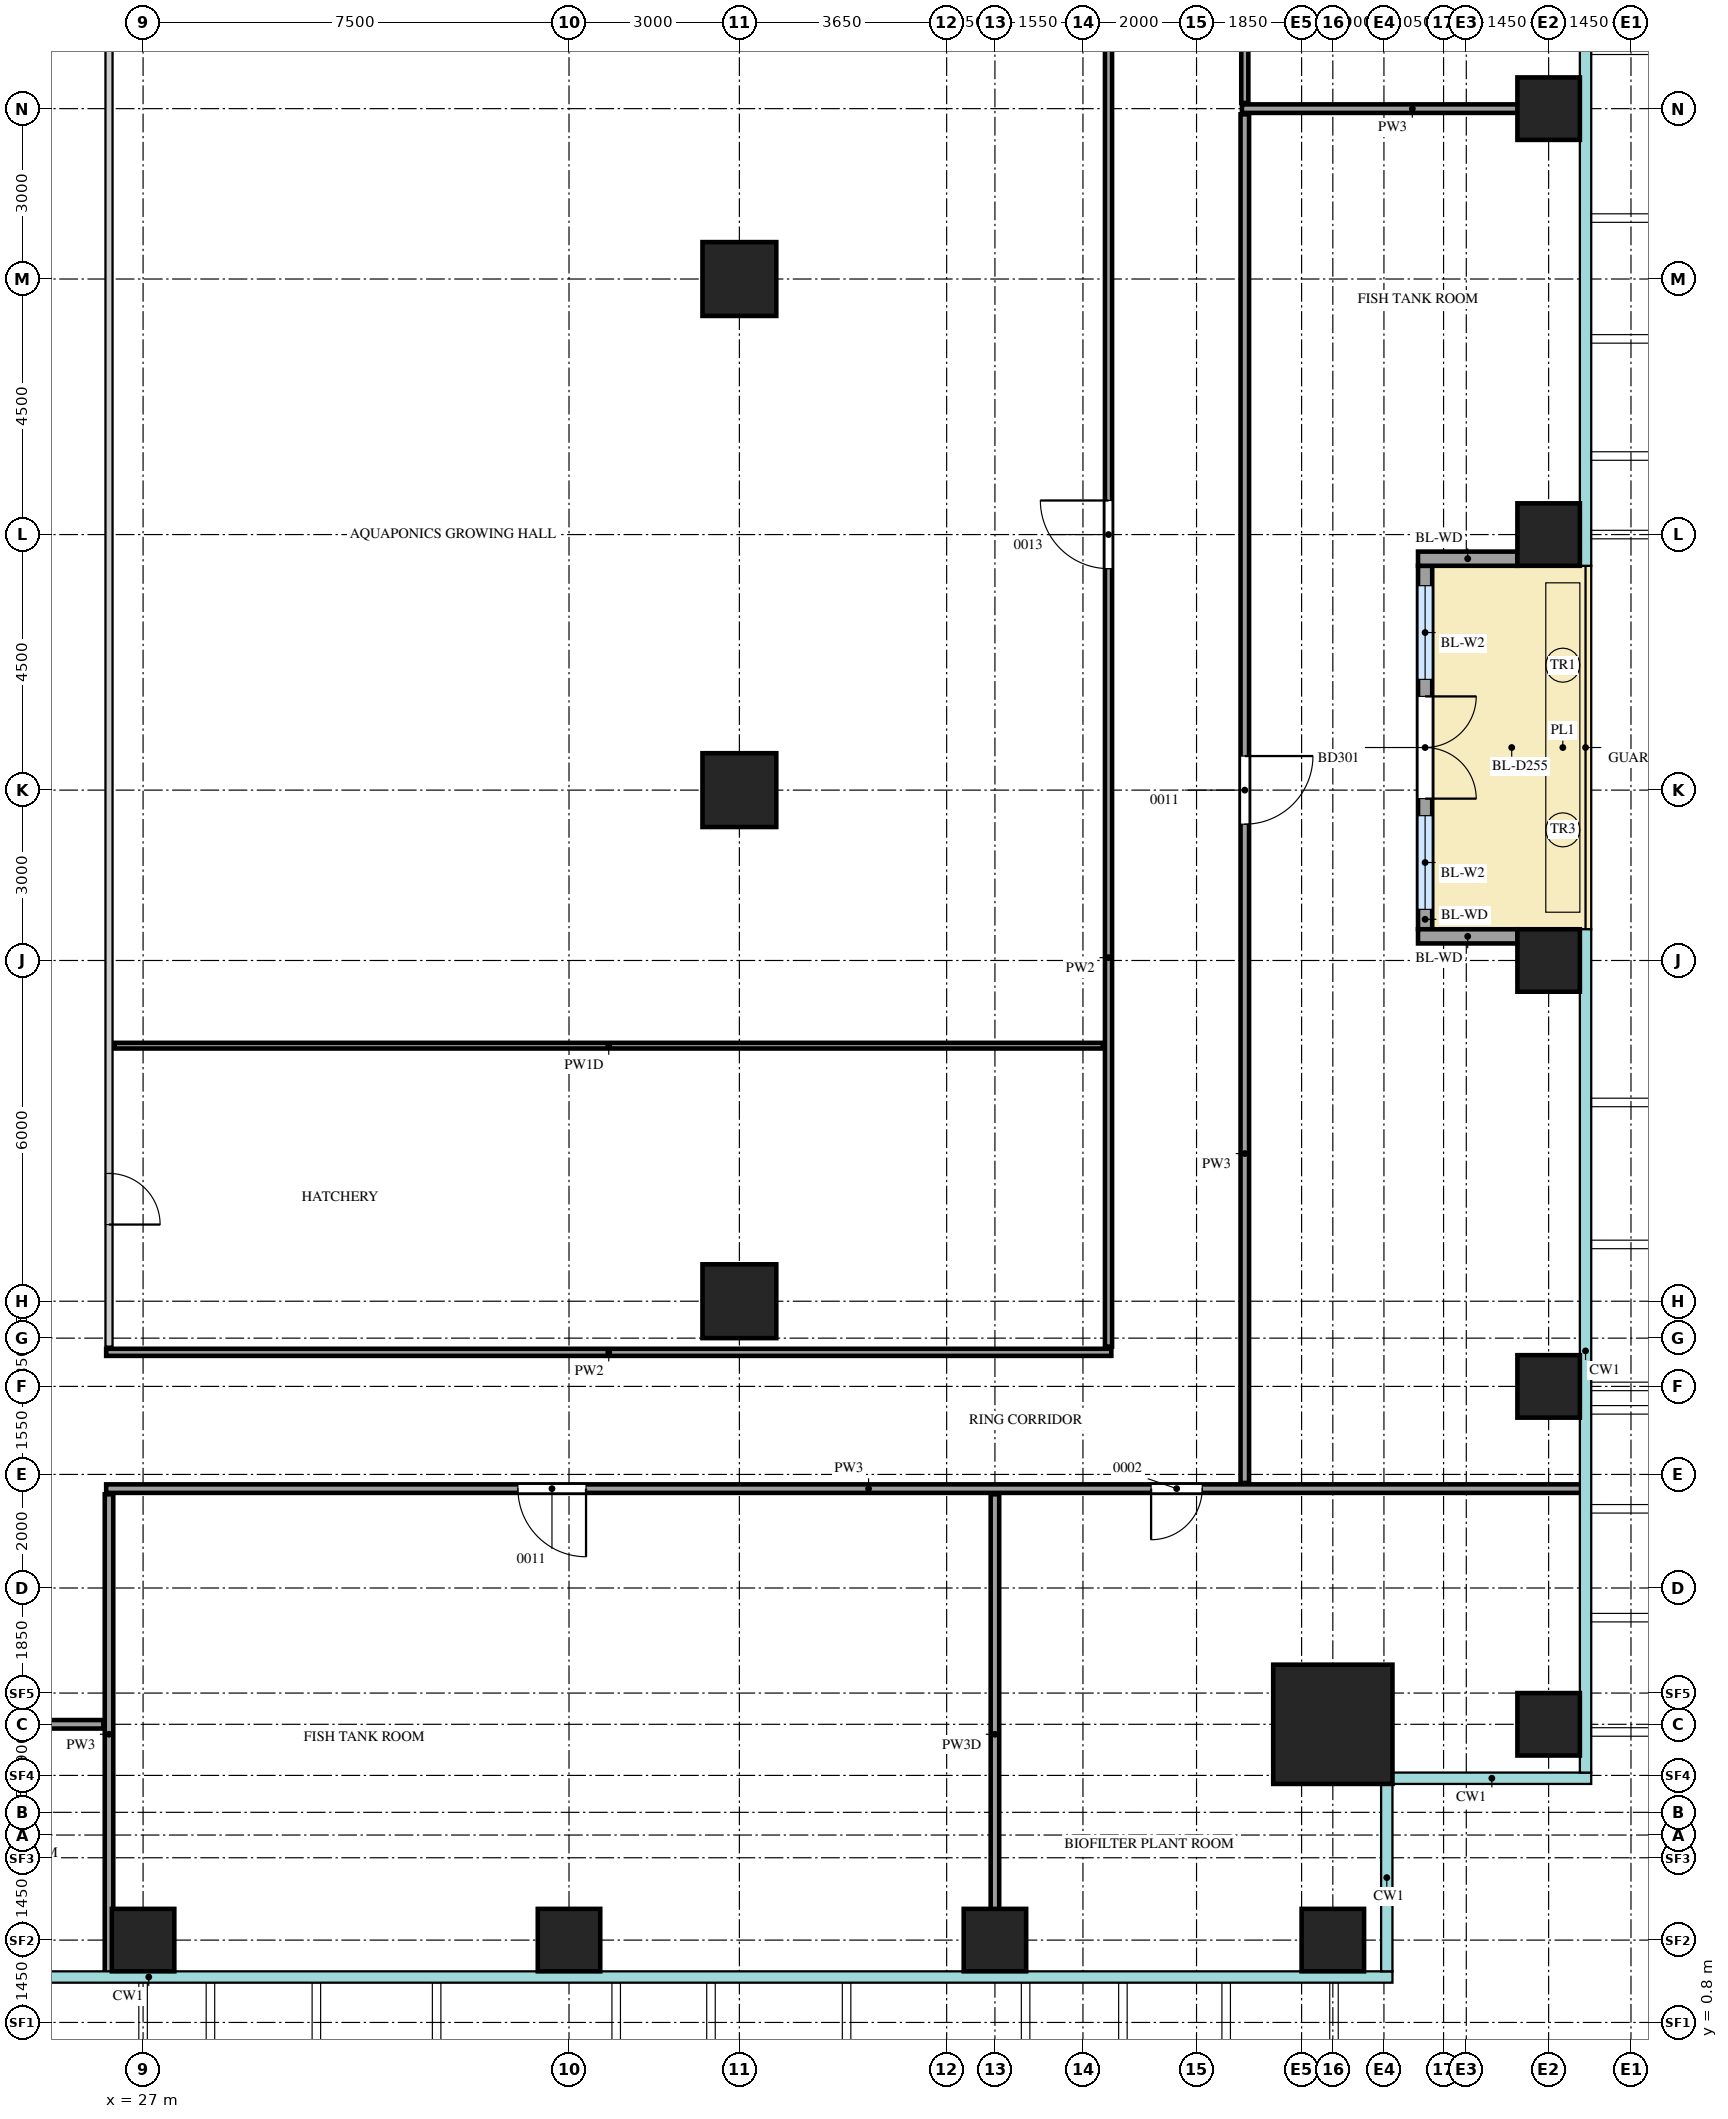
"""IFC4 building model, lengths in metres.
Left out: names, types, materials, properties, quantities, classifications, styles, units other than length and angle.
Written with IfcOpenShell. Run it as: python <this file> out.ifc"""

import sys

from ifc_helpers import new_model, si_unit, direction, frame, frame_2d, origin, origin_2d, place, context, subcontext, project, spatial, rectangle, extrude, source, transform, mapped, element, fill, save


model = new_model("IFC4")
c1 = context("Model", 3, precision=1e-05, world=origin(), true_north=direction((0.0, 1.0)))
c2 = subcontext(c1, "Body", "Model", "MODEL_VIEW")
j1 = project(units=[si_unit("LENGTHUNIT", "METRE"), si_unit("PLANEANGLEUNIT", "RADIAN")], contexts=[c1])
p1 = place(None, origin())
s1 = spatial("IfcSite", under=j1, at=p1, CompositionType="ELEMENT")
p2 = place(p1, origin())
s2 = spatial("IfcBuilding", under=s1, at=p2, CompositionType="ELEMENT")
p3 = place(p2, frame((0.0, 0.0, 141.1)))
s3 = spatial("IfcBuildingStorey", under=s2, at=p3, CompositionType="ELEMENT", Elevation=141.1)
m1 = source(origin(), c2, "Body", "SweptSolid", [
    extrude(rectangle(XDim=2.1, YDim=2.1, at=origin_2d()), origin(), (0.0, 0.0, 1.0), 4.4),
])
p4 = place(p3, frame((47.95, 6.05, 0.0), z_axis=(0.0, 0.0, 1.0), x_axis=(1.0, 0.0, 0.0)))
e1 = element("IfcColumn", 1, at=p4, inside=s3, PredefinedType="COLUMN", context=c2, shape_type="MappedRepresentation", body=[
    mapped(m1, transform((0.0, 0.0, 0.0))),
])
m2 = source(origin(), c2, "Body", "SweptSolid", [
    extrude(rectangle(XDim=1.1, YDim=1.1, at=origin_2d()), origin(), (0.0, 0.0, 1.0), 4.1),
])
for number, where, z_axis, x_axis in (
    (2, (27.0, 2.25, 0.0), (0.0, 0.0, 1.0), (1.0, 0.0, 0.0)),
    (3, (34.5, 2.25, 0.0), (0.0, 0.0, 1.0), (1.0, 0.0, 0.0)),
    (4, (42.0, 2.25, 0.0), (0.0, 0.0, 1.0), (1.0, 0.0, 0.0)),
    (5, (47.95, 2.25, 0.0), (0.0, 0.0, 1.0), (1.0, 0.0, 0.0)),
    (6, (51.75, 6.05, 0.0), (0.0, 0.0, 1.0), (1.0, 0.0, 0.0)),
    (7, (51.75, 12.0, 0.0), (0.0, 0.0, 1.0), (1.0, 0.0, 0.0)),
    (8, (51.75, 19.5, 0.0), (0.0, 0.0, 1.0), (1.0, 0.0, 0.0)),
    (9, (51.75, 27.0, 0.0), (0.0, 0.0, 1.0), (1.0, 0.0, 0.0)),
    (10, (51.75, 34.5, 0.0), (0.0, 0.0, 1.0), (1.0, 0.0, 0.0)),
):
    element("IfcColumn", number, at=place(p3, frame(where, z_axis=z_axis, x_axis=x_axis)), inside=s3, PredefinedType="COLUMN", context=c2, shape_type="MappedRepresentation", body=[
        mapped(m2, transform((0.0, 0.0, 0.0))),
    ])
m3 = source(origin(), c2, "Body", "SweptSolid", [
    extrude(rectangle(XDim=1.3, YDim=1.3, at=origin_2d()), origin(), (0.0, 0.0, 1.0), 4.1),
])
for number, where, z_axis, x_axis in (
    (11, (37.5, 13.5, 0.0), (0.0, 0.0, 1.0), (1.0, 0.0, 0.0)),
    (12, (37.5, 22.5, 0.0), (0.0, 0.0, 1.0), (1.0, 0.0, 0.0)),
    (13, (37.5, 31.5, 0.0), (0.0, 0.0, 1.0), (1.0, 0.0, 0.0)),
):
    element("IfcColumn", number, at=place(p3, frame(where, z_axis=z_axis, x_axis=x_axis)), inside=s3, PredefinedType="COLUMN", context=c2, shape_type="MappedRepresentation", body=[
        mapped(m3, transform((0.0, 0.0, 0.0))),
    ])
m4 = source(origin(), c2, "Body", "SweptSolid", [
    extrude(rectangle(XDim=6.4, YDim=0.25, at=frame_2d((3.2, 0.0))), origin(), (0.0, 0.0, 1.0), 3.55),
])
p5 = place(p3, frame((49.575, 20.05, 0.0), z_axis=(0.0, 0.0, 1.0), x_axis=(0.0, 1.0, 0.0)))
e14 = element("IfcWall", 14, at=p5, inside=s3, PredefinedType="SOLIDWALL", context=c2, shape_type="MappedRepresentation", body=[
    mapped(m4, transform((0.0, 0.0, 0.0))),
])
m5 = source(origin(), c2, "Body", "SweptSolid", [
    extrude(rectangle(XDim=1.65, YDim=2.4, at=frame_2d((0.825, 1.2))), frame((0.0, 0.135, 0.0), z_axis=(0.0, -1.0, 0.0), x_axis=(1.0, 0.0, 0.0)), (0.0, 0.0, 1.0), 0.27),
])
p6 = place(p5, frame((0.35, 0.0, 0.0)))
e15 = element("IfcOpeningElement", 15, at=p6, cuts=e14, PredefinedType="OPENING", context=c2, shape_type="MappedRepresentation", body=[
    mapped(m5, transform((0.0, 0.0, 0.0))),
])
p7 = place(p5, frame((4.4, 0.0, 0.0)))
e16 = element("IfcOpeningElement", 16, at=p7, cuts=e14, PredefinedType="OPENING", context=c2, shape_type="MappedRepresentation", body=[
    mapped(m5, transform((0.0, 0.0, 0.0))),
])
m6 = source(origin(), c2, "Body", "SweptSolid", [
    extrude(rectangle(XDim=1.8, YDim=2.4, at=frame_2d((0.9, 1.2))), frame((0.0, 0.135, 0.0), z_axis=(0.0, -1.0, 0.0), x_axis=(1.0, 0.0, 0.0)), (0.0, 0.0, 1.0), 0.27),
])
p8 = place(p5, frame((2.3, 0.0, 0.0)))
e17 = element("IfcOpeningElement", 17, at=p8, cuts=e14, PredefinedType="OPENING", context=c2, shape_type="MappedRepresentation", body=[
    mapped(m6, transform((0.0, 0.0, 0.0))),
])
m7 = source(origin(), c2, "Body", "SweptSolid", [
    extrude(rectangle(XDim=1.75, YDim=0.25, at=frame_2d((0.875, 0.0))), origin(), (0.0, 0.0, 1.0), 3.55),
])
for number, where, z_axis, x_axis in (
    (18, (51.2, 19.925, 0.0), (0.0, 0.0, 1.0), (-1.0, 0.0, 0.0)),
    (19, (51.2, 26.575, 0.0), (0.0, 0.0, 1.0), (-1.0, 0.0, 0.0)),
):
    element("IfcWall", number, at=place(p3, frame(where, z_axis=z_axis, x_axis=x_axis)), inside=s3, PredefinedType="SOLIDWALL", context=c2, shape_type="MappedRepresentation", body=[
        mapped(m7, transform((0.0, 0.0, 0.0))),
    ])
m8 = source(origin(), c2, "Body", "SweptSolid", [
    extrude(rectangle(XDim=8.45, YDim=0.15, at=frame_2d((4.225, 0.0))), origin(), (0.0, 0.0, 1.0), 4.2),
])
p9 = place(p3, frame((26.4, 1.65, 0.0), z_axis=(0.0, 0.0, 1.0), x_axis=(0.0, 1.0, 0.0)))
e20 = element("IfcWall", 20, at=p9, inside=s3, PredefinedType="PARTITIONING", context=c2, shape_type="MappedRepresentation", body=[
    mapped(m8, transform((0.0, 0.0, 0.0))),
])
m9 = source(origin(), c2, "Body", "SweptSolid", [
    extrude(rectangle(XDim=8.45, YDim=0.15, at=frame_2d((4.225, 0.0))), origin(), (0.0, 0.0, 1.0), 3.6),
])
p10 = place(p3, frame((42.0, 1.65, 0.0), z_axis=(0.0, 0.0, 1.0), x_axis=(0.0, 1.0, 0.0)))
e21 = element("IfcWall", 21, at=p10, inside=s3, PredefinedType="PARTITIONING", context=c2, shape_type="MappedRepresentation", body=[
    mapped(m9, transform((0.0, 0.0, 0.0))),
])
m10 = source(origin(), c2, "Body", "SweptSolid", [
    extrude(rectangle(XDim=14.35, YDim=0.15, at=frame_2d((7.175, 0.0))), origin(), (0.0, 0.0, 1.0), 4.2),
])
p11 = place(p3, frame((11.95, 6.05, 0.0), z_axis=(0.0, 0.0, 1.0), x_axis=(1.0, 0.0, 0.0)))
e22 = element("IfcWall", 22, at=p11, inside=s3, PredefinedType="PARTITIONING", context=c2, shape_type="MappedRepresentation", body=[
    mapped(m10, transform((0.0, 0.0, 0.0))),
])
m11 = source(origin(), c2, "Body", "SweptSolid", [
    extrude(rectangle(XDim=0.9, YDim=2.1, at=frame_2d((0.45, 1.05))), frame((0.0, 0.085, 0.0), z_axis=(0.0, -1.0, 0.0), x_axis=(1.0, 0.0, 0.0)), (0.0, 0.0, 1.0), 0.17),
])
p12 = place(p11, frame((6.8, 0.0, 0.0)))
e23 = element("IfcOpeningElement", 23, at=p12, cuts=e22, PredefinedType="OPENING", context=c2, shape_type="MappedRepresentation", body=[
    mapped(m11, transform((0.0, 0.0, 0.0))),
])
m12 = source(origin(), c2, "Body", "SweptSolid", [
    extrude(rectangle(XDim=26.0, YDim=0.15, at=frame_2d((13.0, 0.0))), origin(), (0.0, 0.0, 1.0), 4.2),
])
p13 = place(p3, frame((26.35, 10.2, 0.0), z_axis=(0.0, 0.0, 1.0), x_axis=(1.0, 0.0, 0.0)))
e24 = element("IfcWall", 24, at=p13, inside=s3, PredefinedType="PARTITIONING", context=c2, shape_type="MappedRepresentation", body=[
    mapped(m12, transform((0.0, 0.0, 0.0))),
])
m13 = source(origin(), c2, "Body", "SweptSolid", [
    extrude(rectangle(XDim=1.2, YDim=2.1, at=frame_2d((0.6, 1.05))), frame((0.0, 0.085, 0.0), z_axis=(0.0, -1.0, 0.0), x_axis=(1.0, 0.0, 0.0)), (0.0, 0.0, 1.0), 0.17),
])
p14 = place(p13, frame((7.25, 0.0, 0.0)))
e25 = element("IfcOpeningElement", 25, at=p14, cuts=e24, PredefinedType="OPENING", context=c2, shape_type="MappedRepresentation", body=[
    mapped(m13, transform((0.0, 0.0, 0.0))),
])
p15 = place(p13, frame((18.4, 0.0, 0.0)))
e26 = element("IfcOpeningElement", 26, at=p15, cuts=e24, PredefinedType="OPENING", context=c2, shape_type="MappedRepresentation", body=[
    mapped(m11, transform((0.0, 0.0, 0.0))),
])
m14 = source(origin(), c2, "Body", "SweptSolid", [
    extrude(rectangle(XDim=24.1, YDim=0.15, at=frame_2d((12.05, 0.0))), origin(), (0.0, 0.0, 1.0), 4.2),
])
p16 = place(p3, frame((46.4, 10.3, 0.0), z_axis=(0.0, 0.0, 1.0), x_axis=(0.0, 1.0, 0.0)))
e27 = element("IfcWall", 27, at=p16, inside=s3, PredefinedType="PARTITIONING", context=c2, shape_type="MappedRepresentation", body=[
    mapped(m14, transform((0.0, 0.0, 0.0))),
])
p17 = place(p16, frame((11.6, 0.0, 0.0)))
e28 = element("IfcOpeningElement", 28, at=p17, cuts=e27, PredefinedType="OPENING", context=c2, shape_type="MappedRepresentation", body=[
    mapped(m13, transform((0.0, 0.0, 0.0))),
])
m15 = source(origin(), c2, "Body", "SweptSolid", [
    extrude(rectangle(XDim=17.7, YDim=0.125, at=frame_2d((8.85, 0.0))), origin(), (0.0, 0.0, 1.0), 4.2),
])
p18 = place(p3, frame((26.35, 12.6, 0.0), z_axis=(0.0, 0.0, 1.0), x_axis=(1.0, 0.0, 0.0)))
e29 = element("IfcWall", 29, at=p18, inside=s3, PredefinedType="PARTITIONING", context=c2, shape_type="MappedRepresentation", body=[
    mapped(m15, transform((0.0, 0.0, 0.0))),
])
m16 = source(origin(), c2, "Body", "SweptSolid", [
    extrude(rectangle(XDim=23.2, YDim=0.125, at=frame_2d((11.6, 0.0))), origin(), (0.0, 0.0, 1.0), 4.2),
])
p19 = place(p3, frame((26.4, 12.7, 0.0), z_axis=(0.0, 0.0, 1.0), x_axis=(0.0, 1.0, 0.0)))
e30 = element("IfcWall", 30, at=p19, inside=s3, PredefinedType="PARTITIONING", context=c2, shape_type="MappedRepresentation", body=[
    mapped(m16, transform((0.0, 0.0, 0.0))),
])
m17 = source(origin(), c2, "Body", "SweptSolid", [
    extrude(rectangle(XDim=0.9, YDim=2.1, at=frame_2d((0.45, 1.05))), frame((0.0, 0.073, 0.0), z_axis=(0.0, -1.0, 0.0), x_axis=(1.0, 0.0, 0.0)), (0.0, 0.0, 1.0), 0.145),
])
p20 = place(p19, frame((2.15, 0.0, 0.0)))
e31 = element("IfcOpeningElement", 31, at=p20, cuts=e30, PredefinedType="OPENING", context=c2, shape_type="MappedRepresentation", body=[
    mapped(m17, transform((0.0, 0.0, 0.0))),
])
m18 = source(origin(), c2, "Body", "SweptSolid", [
    extrude(rectangle(XDim=32.85, YDim=0.125, at=frame_2d((16.425, 0.0))), origin(), (0.0, 0.0, 1.0), 4.2),
])
p21 = place(p3, frame((44.0, 12.7, 0.0), z_axis=(0.0, 0.0, 1.0), x_axis=(0.0, 1.0, 0.0)))
e32 = element("IfcWall", 32, at=p21, inside=s3, PredefinedType="PARTITIONING", context=c2, shape_type="MappedRepresentation", body=[
    mapped(m18, transform((0.0, 0.0, 0.0))),
])
m19 = source(origin(), c2, "Body", "SweptSolid", [
    extrude(rectangle(XDim=1.2, YDim=2.1, at=frame_2d((0.6, 1.05))), frame((0.0, 0.073, 0.0), z_axis=(0.0, -1.0, 0.0), x_axis=(1.0, 0.0, 0.0)), (0.0, 0.0, 1.0), 0.145),
])
p22 = place(p21, frame((13.7, 0.0, 0.0)))
e33 = element("IfcOpeningElement", 33, at=p22, cuts=e32, PredefinedType="OPENING", context=c2, shape_type="MappedRepresentation", body=[
    mapped(m19, transform((0.0, 0.0, 0.0))),
])
p23 = place(p21, frame((27.5, 0.0, 0.0)))
e34 = element("IfcOpeningElement", 34, at=p23, cuts=e32, PredefinedType="OPENING", context=c2, shape_type="MappedRepresentation", body=[
    mapped(m19, transform((0.0, 0.0, 0.0))),
])
m20 = source(origin(), c2, "Body", "SweptSolid", [
    extrude(rectangle(XDim=17.4, YDim=0.1, at=frame_2d((8.7, 0.0))), origin(), (0.0, 0.0, 1.0), 4.2),
])
p24 = place(p3, frame((26.5, 18.0, 0.0), z_axis=(0.0, 0.0, 1.0), x_axis=(1.0, 0.0, 0.0)))
e35 = element("IfcWall", 35, at=p24, inside=s3, PredefinedType="PARTITIONING", context=c2, shape_type="MappedRepresentation", body=[
    mapped(m20, transform((0.0, 0.0, 0.0))),
])
m21 = source(origin(), c2, "Body", "SweptSolid", [
    extrude(rectangle(XDim=6.0, YDim=0.15, at=frame_2d((3.0, 0.0))), origin(), (0.0, 0.0, 1.0), 4.2),
])
p25 = place(p3, frame((46.35, 34.5, 0.0), z_axis=(0.0, 0.0, 1.0), x_axis=(1.0, 0.0, 0.0)))
e36 = element("IfcWall", 36, at=p25, inside=s3, PredefinedType="PARTITIONING", context=c2, shape_type="MappedRepresentation", body=[
    mapped(m21, transform((0.0, 0.0, 0.0))),
])
m22 = source(origin(), c2, "Body", "SweptSolid", [
    extrude(rectangle(XDim=13.35, YDim=0.125, at=frame_2d((6.675, 0.0))), origin(), (0.0, 0.0, 1.0), 4.2),
])
p26 = place(p3, frame((46.4, 34.6, 0.0), z_axis=(0.0, 0.0, 1.0), x_axis=(0.0, 1.0, 0.0)))
e37 = element("IfcWall", 37, at=p26, inside=s3, PredefinedType="PARTITIONING", context=c2, shape_type="MappedRepresentation", body=[
    mapped(m22, transform((0.0, 0.0, 0.0))),
])
p27 = place(p26, frame((4.9, 0.0, 0.0)))
e38 = element("IfcOpeningElement", 38, at=p27, cuts=e37, PredefinedType="OPENING", context=c2, shape_type="MappedRepresentation", body=[
    mapped(m19, transform((0.0, 0.0, 0.0))),
])
m23 = source(origin(), c2, "Body", "SweptSolid", [
    extrude(rectangle(XDim=1.65, YDim=2.4, at=frame_2d((0.825, 1.2))), frame((0.0, 0.03, 0.0), z_axis=(0.0, -1.0, 0.0), x_axis=(1.0, 0.0, 0.0)), (0.0, 0.0, 1.0), 0.06),
])
p28 = place(p6, origin())
e39 = element("IfcWindow", 39, at=p28, inside=s3, PartitioningType="SINGLE_PANEL", PredefinedType="WINDOW", context=c2, shape_type="MappedRepresentation", body=[
    mapped(m23, transform((0.0, 0.0, 0.0))),
])
fill(e15, e39)
p29 = place(p7, origin())
e40 = element("IfcWindow", 40, at=p29, inside=s3, PartitioningType="SINGLE_PANEL", PredefinedType="WINDOW", context=c2, shape_type="MappedRepresentation", body=[
    mapped(m23, transform((0.0, 0.0, 0.0))),
])
fill(e16, e40)
m24 = source(origin(), c2, "Body", "SweptSolid", [
    extrude(rectangle(XDim=1.8, YDim=2.4, at=frame_2d((0.9, 1.2))), frame((0.0, 0.025, 0.0), z_axis=(0.0, -1.0, 0.0), x_axis=(1.0, 0.0, 0.0)), (0.0, 0.0, 1.0), 0.05),
])
p30 = place(p8, origin())
e41 = element("IfcDoor", 41, at=p30, inside=s3, OperationType="DOUBLE_DOOR_DOUBLE_SWING", PredefinedType="DOOR", context=c2, shape_type="MappedRepresentation", body=[
    mapped(m24, transform((0.0, 0.0, 0.0))),
])
fill(e17, e41)
m25 = source(origin(), c2, "Body", "SweptSolid", [
    extrude(rectangle(XDim=1.2, YDim=2.1, at=frame_2d((0.6, 1.05))), frame((0.0, 0.025, 0.0), z_axis=(0.0, -1.0, 0.0), x_axis=(1.0, 0.0, 0.0)), (0.0, 0.0, 1.0), 0.05),
])
p31 = place(p14, origin())
e42 = element("IfcDoor", 42, at=p31, inside=s3, OperationType="SINGLE_SWING_RIGHT", PredefinedType="DOOR", context=c2, shape_type="MappedRepresentation", body=[
    mapped(m25, transform((0.0, 0.0, 0.0))),
])
fill(e25, e42)
m26 = source(origin(), c2, "Body", "SweptSolid", [
    extrude(rectangle(XDim=0.9, YDim=2.1, at=frame_2d((0.45, 1.05))), frame((0.0, 0.025, 0.0), z_axis=(0.0, -1.0, 0.0), x_axis=(1.0, 0.0, 0.0)), (0.0, 0.0, 1.0), 0.05),
])
p32 = place(p15, origin())
e43 = element("IfcDoor", 43, at=p32, inside=s3, OperationType="SINGLE_SWING_LEFT", PredefinedType="DOOR", context=c2, shape_type="MappedRepresentation", body=[
    mapped(m26, transform((0.0, 0.0, 0.0))),
])
fill(e26, e43)
p33 = place(p20, origin())
e44 = element("IfcDoor", 44, at=p33, inside=s3, OperationType="SINGLE_SWING_LEFT", PredefinedType="DOOR", context=c2, shape_type="MappedRepresentation", body=[
    mapped(m26, transform((0.0, 0.0, 0.0))),
])
fill(e31, e44)
p34 = place(p22, origin())
e45 = element("IfcDoor", 45, at=p34, inside=s3, OperationType="SINGLE_SWING_LEFT", PredefinedType="DOOR", context=c2, shape_type="MappedRepresentation", body=[
    mapped(m25, transform((0.0, 0.0, 0.0))),
])
fill(e33, e45)
p35 = place(p17, origin())
e46 = element("IfcDoor", 46, at=p35, inside=s3, OperationType="SINGLE_SWING_RIGHT", PredefinedType="DOOR", context=c2, shape_type="MappedRepresentation", body=[
    mapped(m25, transform((0.0, 0.0, 0.0))),
])
fill(e28, e46)
save(model, sys.argv[1])
